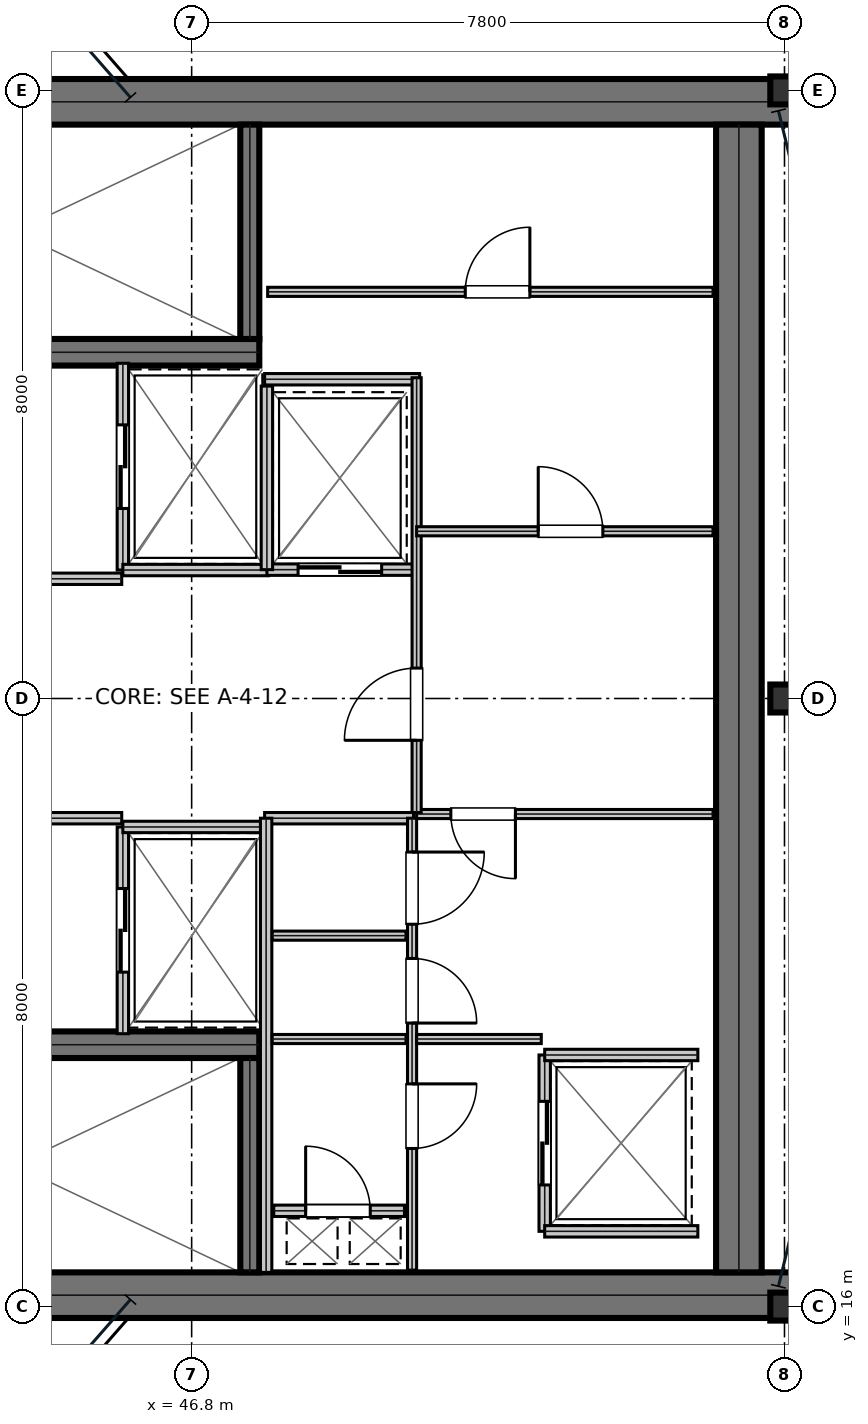
"""IFC4 building model, lengths in metres.
Left out: names, types, materials, properties, quantities, classifications, styles, units other than length and angle.
Written with IfcOpenShell. Run it as: python <this file> out.ifc"""

import sys

from ifc_helpers import new_model, si_unit, direction, frame, frame_2d, origin, origin_2d, place, context, subcontext, project, spatial, rectangle, i_section, extrude, element, fill, save


model = new_model("IFC4")
c1 = context("Model", 3, precision=1e-05, world=origin(), true_north=direction((0.0, 1.0)))
c2 = subcontext(c1, "Body", "Model", "MODEL_VIEW")
j1 = project(units=[si_unit("LENGTHUNIT", "METRE"), si_unit("PLANEANGLEUNIT", "RADIAN")], contexts=[c1])
p1 = place(None, origin())
s1 = spatial("IfcSite", under=j1, at=p1, CompositionType="ELEMENT")
p2 = place(p1, origin())
s2 = spatial("IfcBuilding", under=s1, at=p2, CompositionType="ELEMENT")
p3 = place(p2, frame((0.0, 0.0, 266.85)))
s3 = spatial("IfcBuildingStorey", under=s2, at=p3, CompositionType="ELEMENT", Elevation=266.85)
for number, where, z_axis, x_axis in (
    (1, (38.8, 31.85, 0.0), (0.0, 0.0, 1.0), (1.0, 0.0, 0.0)),
    (2, (38.8, 16.15, 0.0), (0.0, 0.0, 1.0), (1.0, 0.0, 0.0)),
):
    element("IfcWall", number, at=place(p3, frame(where, z_axis=z_axis, x_axis=x_axis)), inside=s3, PredefinedType="SHEAR", context=c2, shape_type="SweptSolid", body=[
        extrude(rectangle(XDim=16.0, YDim=0.6, at=frame_2d((8.0, 0.0))), origin(), (0.0, 0.0, 1.0), 3.81),
    ])
p4 = place(p3, frame((54.0, 16.45, 0.0), z_axis=(0.0, 0.0, 1.0), x_axis=(0.0, 1.0, 0.0)))
e3 = element("IfcWall", 3, at=p4, inside=s3, PredefinedType="SHEAR", context=c2, shape_type="SweptSolid", body=[
    extrude(rectangle(XDim=15.1, YDim=0.6, at=frame_2d((7.55, 0.0))), origin(), (0.0, 0.0, 1.0), 3.81),
])
p5 = place(p3, frame((39.98, 28.555, 0.0), z_axis=(0.0, 0.0, 1.0), x_axis=(1.0, 0.0, 0.0)))
e4 = element("IfcWall", 4, at=p5, inside=s3, PredefinedType="SHEAR", context=c2, shape_type="SweptSolid", body=[
    extrude(rectangle(XDim=7.71, YDim=0.35, at=frame_2d((3.855, 0.0))), origin(), (0.0, 0.0, 1.0), 3.81),
])
p6 = place(p5, frame((0.25, 0.0, 0.0)))
e5 = element("IfcOpeningElement", 5, at=p6, cuts=e4, PredefinedType="OPENING", context=c2, shape_type="SweptSolid", body=[
    extrude(rectangle(XDim=1.1, YDim=2.15, at=frame_2d((0.55, 1.075))), frame((0.0, 0.185, 0.0), z_axis=(0.0, -1.0, 0.0), x_axis=(1.0, 0.0, 0.0)), (0.0, 0.0, 1.0), 0.37),
])
p7 = place(p3, frame((39.98, 19.445, 0.0), z_axis=(0.0, 0.0, 1.0), x_axis=(1.0, 0.0, 0.0)))
e6 = element("IfcWall", 6, at=p7, inside=s3, PredefinedType="SHEAR", context=c2, shape_type="SweptSolid", body=[
    extrude(rectangle(XDim=7.71, YDim=0.35, at=frame_2d((3.855, 0.0))), origin(), (0.0, 0.0, 1.0), 3.81),
])
p8 = place(p7, frame((0.25, 0.0, 0.0)))
e7 = element("IfcOpeningElement", 7, at=p8, cuts=e6, PredefinedType="OPENING", context=c2, shape_type="SweptSolid", body=[
    extrude(rectangle(XDim=1.1, YDim=2.15, at=frame_2d((0.55, 1.075))), frame((0.0, 0.185, 0.0), z_axis=(0.0, -1.0, 0.0), x_axis=(1.0, 0.0, 0.0)), (0.0, 0.0, 1.0), 0.37),
])
for number, where, z_axis, x_axis in (
    (8, (47.565, 28.73, 0.0), (0.0, 0.0, 1.0), (0.0, 1.0, 0.0)),
    (9, (47.565, 16.45, 0.0), (0.0, 0.0, 1.0), (0.0, 1.0, 0.0)),
):
    element("IfcWall", number, at=place(p3, frame(where, z_axis=z_axis, x_axis=x_axis)), inside=s3, PredefinedType="SHEAR", context=c2, shape_type="SweptSolid", body=[
        extrude(rectangle(XDim=2.82, YDim=0.25, at=frame_2d((1.41, 0.0))), origin(), (0.0, 0.0, 1.0), 3.81),
    ])
for number, where, z_axis, x_axis in (
    (10, (54.6, 16.0, 0.0), (0.0, 0.0, 1.0), (1.0, 0.0, 0.0)),
    (11, (54.6, 24.0, 0.0), (0.0, 0.0, 1.0), (1.0, 0.0, 0.0)),
    (12, (54.6, 32.0, 0.0), (0.0, 0.0, 1.0), (1.0, 0.0, 0.0)),
):
    element("IfcColumn", number, at=place(p3, frame(where, z_axis=z_axis, x_axis=x_axis)), inside=s3, PredefinedType="COLUMN", context=c2, shape_type="SweptSolid", body=[
        extrude(i_section(OverallWidth=0.373, OverallDepth=0.368, WebThickness=0.015, FlangeThickness=0.024, at=origin_2d()), origin(), (0.0, 0.0, 1.0), 4.044),
    ])
p9 = place(p3, frame((39.98, 25.575, 0.0), z_axis=(0.0, 0.0, 1.0), x_axis=(1.0, 0.0, 0.0)))
e13 = element("IfcWall", 13, at=p9, inside=s3, PredefinedType="PARTITIONING", context=c2, shape_type="SweptSolid", body=[
    extrude(rectangle(XDim=5.9, YDim=0.15, at=frame_2d((2.95, 0.0))), origin(), (0.0, 0.0, 1.0), 3.81),
])
p10 = place(p9, frame((2.35, 0.0, 0.0)))
e14 = element("IfcOpeningElement", 14, at=p10, cuts=e13, PredefinedType="OPENING", context=c2, shape_type="SweptSolid", body=[
    extrude(rectangle(XDim=1.05, YDim=2.15, at=frame_2d((0.525, 1.075))), frame((0.0, 0.085, 0.0), z_axis=(0.0, -1.0, 0.0), x_axis=(1.0, 0.0, 0.0)), (0.0, 0.0, 1.0), 0.17),
])
p11 = place(p3, frame((39.98, 22.425, 0.0), z_axis=(0.0, 0.0, 1.0), x_axis=(1.0, 0.0, 0.0)))
e15 = element("IfcWall", 15, at=p11, inside=s3, PredefinedType="PARTITIONING", context=c2, shape_type="SweptSolid", body=[
    extrude(rectangle(XDim=5.9, YDim=0.15, at=frame_2d((2.95, 0.0))), origin(), (0.0, 0.0, 1.0), 3.81),
])
p12 = place(p11, frame((2.35, 0.0, 0.0)))
e16 = element("IfcOpeningElement", 16, at=p12, cuts=e15, PredefinedType="OPENING", context=c2, shape_type="SweptSolid", body=[
    extrude(rectangle(XDim=1.05, YDim=2.15, at=frame_2d((0.525, 1.075))), frame((0.0, 0.085, 0.0), z_axis=(0.0, -1.0, 0.0), x_axis=(1.0, 0.0, 0.0)), (0.0, 0.0, 1.0), 0.17),
])
p13 = place(p3, frame((45.895, 25.69, 0.0), z_axis=(0.0, 0.0, 1.0), x_axis=(0.0, 1.0, 0.0)))
e17 = element("IfcWall", 17, at=p13, inside=s3, PredefinedType="PARTITIONING", context=c2, shape_type="SweptSolid", body=[
    extrude(rectangle(XDim=2.72, YDim=0.15, at=frame_2d((1.36, 0.0))), origin(), (0.0, 0.0, 1.0), 3.81),
])
p14 = place(p13, frame((0.81, 0.0, 0.0)))
e18 = element("IfcOpeningElement", 18, at=p14, cuts=e17, PredefinedType="OPENING", context=c2, shape_type="SweptSolid", body=[
    extrude(rectangle(XDim=1.1, YDim=2.15, at=frame_2d((0.55, 1.075))), frame((0.0, 0.085, 0.0), z_axis=(0.0, -1.0, 0.0), x_axis=(1.0, 0.0, 0.0)), (0.0, 0.0, 1.0), 0.17),
])
p15 = place(p3, frame((45.895, 25.69, 0.0), z_axis=(0.0, 0.0, 1.0), x_axis=(1.0, 0.0, 0.0)))
e19 = element("IfcWall", 19, at=p15, inside=s3, PredefinedType="PARTITIONING", context=c2, shape_type="SweptSolid", body=[
    extrude(rectangle(XDim=1.915, YDim=0.15, at=frame_2d((0.958, 0.0))), origin(), (0.0, 0.0, 1.0), 3.81),
])
p16 = place(p3, frame((45.895, 19.59, 0.0), z_axis=(0.0, 0.0, 1.0), x_axis=(0.0, 1.0, 0.0)))
e20 = element("IfcWall", 20, at=p16, inside=s3, PredefinedType="PARTITIONING", context=c2, shape_type="SweptSolid", body=[
    extrude(rectangle(XDim=2.72, YDim=0.15, at=frame_2d((1.36, 0.0))), origin(), (0.0, 0.0, 1.0), 3.81),
])
p17 = place(p16, frame((0.81, 0.0, 0.0)))
e21 = element("IfcOpeningElement", 21, at=p17, cuts=e20, PredefinedType="OPENING", context=c2, shape_type="SweptSolid", body=[
    extrude(rectangle(XDim=1.1, YDim=2.15, at=frame_2d((0.55, 1.075))), frame((0.0, 0.085, 0.0), z_axis=(0.0, -1.0, 0.0), x_axis=(1.0, 0.0, 0.0)), (0.0, 0.0, 1.0), 0.17),
])
p18 = place(p3, frame((45.895, 22.31, 0.0), z_axis=(0.0, 0.0, 1.0), x_axis=(1.0, 0.0, 0.0)))
e22 = element("IfcWall", 22, at=p18, inside=s3, PredefinedType="PARTITIONING", context=c2, shape_type="SweptSolid", body=[
    extrude(rectangle(XDim=1.915, YDim=0.15, at=frame_2d((0.958, 0.0))), origin(), (0.0, 0.0, 1.0), 3.81),
])
p19 = place(p3, frame((47.79, 25.695, 0.0), z_axis=(0.0, 0.0, 1.0), x_axis=(1.0, 0.0, 0.0)))
e23 = element("IfcWall", 23, at=p19, inside=s3, PredefinedType="PARTITIONING", context=c2, shape_type="SweptSolid", body=[
    extrude(rectangle(XDim=1.92, YDim=0.15, at=frame_2d((0.96, 0.0))), origin(), (0.0, 0.0, 1.0), 3.81),
])
p20 = place(p19, frame((0.41, 0.0, 0.0)))
e24 = element("IfcOpeningElement", 24, at=p20, cuts=e23, PredefinedType="OPENING", context=c2, shape_type="SweptSolid", body=[
    extrude(rectangle(XDim=1.1, YDim=2.15, at=frame_2d((0.55, 1.075))), frame((0.0, 0.085, 0.0), z_axis=(0.0, -1.0, 0.0), x_axis=(1.0, 0.0, 0.0)), (0.0, 0.0, 1.0), 0.17),
])
p21 = place(p3, frame((47.79, 25.695, 0.0), z_axis=(0.0, 0.0, 1.0), x_axis=(0.0, 1.0, 0.0)))
e25 = element("IfcWall", 25, at=p21, inside=s3, PredefinedType="PARTITIONING", context=c2, shape_type="SweptSolid", body=[
    extrude(rectangle(XDim=2.415, YDim=0.15, at=frame_2d((1.208, 0.0))), origin(), (0.0, 0.0, 1.0), 3.81),
])
p22 = place(p3, frame((51.445, 16.99, 0.0), z_axis=(0.0, 0.0, 1.0), x_axis=(0.0, 1.0, 0.0)))
e26 = element("IfcWall", 26, at=p22, inside=s3, PredefinedType="PARTITIONING", context=c2, shape_type="SweptSolid", body=[
    extrude(rectangle(XDim=2.32, YDim=0.15, at=frame_2d((1.16, 0.0))), origin(), (0.0, 0.0, 1.0), 3.81),
])
p23 = place(p22, frame((0.61, 0.0, 0.0)))
e27 = element("IfcOpeningElement", 27, at=p23, cuts=e26, PredefinedType="OPENING", context=c2, shape_type="SweptSolid", body=[
    extrude(rectangle(XDim=1.1, YDim=2.15, at=frame_2d((0.55, 1.075))), frame((0.0, 0.085, 0.0), z_axis=(0.0, -1.0, 0.0), x_axis=(1.0, 0.0, 0.0)), (0.0, 0.0, 1.0), 0.17),
])
for number, where, z_axis, x_axis in (
    (28, (51.445, 16.99, 0.0), (0.0, 0.0, 1.0), (1.0, 0.0, 0.0)),
    (29, (51.445, 19.31, 0.0), (0.0, 0.0, 1.0), (1.0, 0.0, 0.0)),
):
    element("IfcWall", number, at=place(p3, frame(where, z_axis=z_axis, x_axis=x_axis)), inside=s3, PredefinedType="PARTITIONING", context=c2, shape_type="SweptSolid", body=[
        extrude(rectangle(XDim=2.015, YDim=0.15, at=frame_2d((1.007, 0.0))), origin(), (0.0, 0.0, 1.0), 3.81),
    ])
p24 = place(p3, frame((47.88, 17.26, 0.0), z_axis=(0.0, 0.0, 1.0), x_axis=(1.0, 0.0, 0.0)))
e30 = element("IfcWall", 30, at=p24, inside=s3, PredefinedType="PARTITIONING", context=c2, shape_type="SweptSolid", body=[
    extrude(rectangle(XDim=1.72, YDim=0.15, at=frame_2d((0.86, 0.0))), origin(), (0.0, 0.0, 1.0), 3.81),
])
p25 = place(p24, frame((0.42, 0.0, 0.0)))
e31 = element("IfcOpeningElement", 31, at=p25, cuts=e30, PredefinedType="OPENING", context=c2, shape_type="SweptSolid", body=[
    extrude(rectangle(XDim=0.85, YDim=2.15, at=frame_2d((0.425, 1.075))), frame((0.0, 0.085, 0.0), z_axis=(0.0, -1.0, 0.0), x_axis=(1.0, 0.0, 0.0)), (0.0, 0.0, 1.0), 0.17),
])
p26 = place(p3, frame((47.76, 22.425, 0.0), z_axis=(0.0, 0.0, 1.0), x_axis=(1.0, 0.0, 0.0)))
e32 = element("IfcWall", 32, at=p26, inside=s3, PredefinedType="PARTITIONING", context=c2, shape_type="SweptSolid", body=[
    extrude(rectangle(XDim=1.96, YDim=0.15, at=frame_2d((0.98, 0.0))), origin(), (0.0, 0.0, 1.0), 3.81),
])
p27 = place(p3, frame((47.78, 16.45, 0.0), z_axis=(0.0, 0.0, 1.0), x_axis=(0.0, 1.0, 0.0)))
e33 = element("IfcWall", 33, at=p27, inside=s3, PredefinedType="PARTITIONING", context=c2, shape_type="SweptSolid", body=[
    extrude(rectangle(XDim=5.975, YDim=0.15, at=frame_2d((2.988, 0.0))), origin(), (0.0, 0.0, 1.0), 3.81),
])
for number, where, z_axis, x_axis in (
    (34, (47.86, 19.52, 0.0), (0.0, 0.0, 1.0), (1.0, 0.0, 0.0)),
    (35, (47.86, 20.88, 0.0), (0.0, 0.0, 1.0), (1.0, 0.0, 0.0)),
):
    element("IfcWall", number, at=place(p3, frame(where, z_axis=z_axis, x_axis=x_axis)), inside=s3, PredefinedType="PARTITIONING", context=c2, shape_type="SweptSolid", body=[
        extrude(rectangle(XDim=1.76, YDim=0.12, at=frame_2d((0.88, 0.0))), origin(), (0.0, 0.0, 1.0), 3.81),
    ])
p28 = place(p3, frame((49.7, 16.48, 0.0), z_axis=(0.0, 0.0, 1.0), x_axis=(0.0, 1.0, 0.0)))
e36 = element("IfcWall", 36, at=p28, inside=s3, PredefinedType="PARTITIONING", context=c2, shape_type="SweptSolid", body=[
    extrude(rectangle(XDim=5.945, YDim=0.12, at=frame_2d((2.973, 0.0))), origin(), (0.0, 0.0, 1.0), 3.81),
])
p29 = place(p28, frame((1.6, 0.0, 0.0)))
e37 = element("IfcOpeningElement", 37, at=p29, cuts=e36, PredefinedType="OPENING", context=c2, shape_type="SweptSolid", body=[
    extrude(rectangle(XDim=0.85, YDim=2.15, at=frame_2d((0.425, 1.075))), frame((0.0, 0.07, 0.0), z_axis=(0.0, -1.0, 0.0), x_axis=(1.0, 0.0, 0.0)), (0.0, 0.0, 1.0), 0.14),
])
p30 = place(p28, frame((3.25, 0.0, 0.0)))
e38 = element("IfcOpeningElement", 38, at=p30, cuts=e36, PredefinedType="OPENING", context=c2, shape_type="SweptSolid", body=[
    extrude(rectangle(XDim=0.85, YDim=2.15, at=frame_2d((0.425, 1.075))), frame((0.0, 0.07, 0.0), z_axis=(0.0, -1.0, 0.0), x_axis=(1.0, 0.0, 0.0)), (0.0, 0.0, 1.0), 0.14),
])
p31 = place(p28, frame((4.55, 0.0, 0.0)))
e39 = element("IfcOpeningElement", 39, at=p31, cuts=e36, PredefinedType="OPENING", context=c2, shape_type="SweptSolid", body=[
    extrude(rectangle(XDim=0.95, YDim=2.15, at=frame_2d((0.475, 1.075))), frame((0.0, 0.07, 0.0), z_axis=(0.0, -1.0, 0.0), x_axis=(1.0, 0.0, 0.0)), (0.0, 0.0, 1.0), 0.14),
])
p32 = place(p3, frame((49.76, 22.48, 0.0), z_axis=(0.0, 0.0, 1.0), x_axis=(1.0, 0.0, 0.0)))
e40 = element("IfcWall", 40, at=p32, inside=s3, PredefinedType="PARTITIONING", context=c2, shape_type="SweptSolid", body=[
    extrude(rectangle(XDim=3.9, YDim=0.12, at=frame_2d((1.95, 0.0))), origin(), (0.0, 0.0, 1.0), 3.81),
])
p33 = place(p32, frame((0.45, 0.0, 0.0)))
e41 = element("IfcOpeningElement", 41, at=p33, cuts=e40, PredefinedType="OPENING", context=c2, shape_type="SweptSolid", body=[
    extrude(rectangle(XDim=0.85, YDim=2.15, at=frame_2d((0.425, 1.075))), frame((0.0, 0.07, 0.0), z_axis=(0.0, -1.0, 0.0), x_axis=(1.0, 0.0, 0.0)), (0.0, 0.0, 1.0), 0.14),
])
p34 = place(p3, frame((49.76, 19.52, 0.0), z_axis=(0.0, 0.0, 1.0), x_axis=(1.0, 0.0, 0.0)))
e42 = element("IfcWall", 42, at=p34, inside=s3, PredefinedType="PARTITIONING", context=c2, shape_type="SweptSolid", body=[
    extrude(rectangle(XDim=1.64, YDim=0.12, at=frame_2d((0.82, 0.0))), origin(), (0.0, 0.0, 1.0), 3.81),
])
p35 = place(p3, frame((47.76, 28.2, 0.0), z_axis=(0.0, 0.0, 1.0), x_axis=(1.0, 0.0, 0.0)))
e43 = element("IfcWall", 43, at=p35, inside=s3, PredefinedType="PARTITIONING", context=c2, shape_type="SweptSolid", body=[
    extrude(rectangle(XDim=2.04, YDim=0.15, at=frame_2d((1.02, 0.0))), origin(), (0.0, 0.0, 1.0), 3.81),
])
p36 = place(p3, frame((49.76, 22.5, 0.0), z_axis=(0.0, 0.0, 1.0), x_axis=(0.0, 1.0, 0.0)))
e44 = element("IfcWall", 44, at=p36, inside=s3, PredefinedType="PARTITIONING", context=c2, shape_type="SweptSolid", body=[
    extrude(rectangle(XDim=5.72, YDim=0.12, at=frame_2d((2.86, 0.0))), origin(), (0.0, 0.0, 1.0), 3.81),
])
p37 = place(p36, frame((0.95, 0.0, 0.0)))
e45 = element("IfcOpeningElement", 45, at=p37, cuts=e44, PredefinedType="OPENING", context=c2, shape_type="SweptSolid", body=[
    extrude(rectangle(XDim=0.95, YDim=2.15, at=frame_2d((0.475, 1.075))), frame((0.0, 0.07, 0.0), z_axis=(0.0, -1.0, 0.0), x_axis=(1.0, 0.0, 0.0)), (0.0, 0.0, 1.0), 0.14),
])
p38 = place(p3, frame((49.76, 26.2, 0.0), z_axis=(0.0, 0.0, 1.0), x_axis=(1.0, 0.0, 0.0)))
e46 = element("IfcWall", 46, at=p38, inside=s3, PredefinedType="PARTITIONING", context=c2, shape_type="SweptSolid", body=[
    extrude(rectangle(XDim=3.9, YDim=0.12, at=frame_2d((1.95, 0.0))), origin(), (0.0, 0.0, 1.0), 3.81),
])
p39 = place(p38, frame((1.6, 0.0, 0.0)))
e47 = element("IfcOpeningElement", 47, at=p39, cuts=e46, PredefinedType="OPENING", context=c2, shape_type="SweptSolid", body=[
    extrude(rectangle(XDim=0.85, YDim=2.15, at=frame_2d((0.425, 1.075))), frame((0.0, 0.07, 0.0), z_axis=(0.0, -1.0, 0.0), x_axis=(1.0, 0.0, 0.0)), (0.0, 0.0, 1.0), 0.14),
])
p40 = place(p3, frame((47.8, 29.35, 0.0), z_axis=(0.0, 0.0, 1.0), x_axis=(1.0, 0.0, 0.0)))
e48 = element("IfcWall", 48, at=p40, inside=s3, PredefinedType="PARTITIONING", context=c2, shape_type="SweptSolid", body=[
    extrude(rectangle(XDim=5.86, YDim=0.12, at=frame_2d((2.93, 0.0))), origin(), (0.0, 0.0, 1.0), 3.81),
])
p41 = place(p40, frame((2.6, 0.0, 0.0)))
e49 = element("IfcOpeningElement", 49, at=p41, cuts=e48, PredefinedType="OPENING", context=c2, shape_type="SweptSolid", body=[
    extrude(rectangle(XDim=0.85, YDim=2.15, at=frame_2d((0.425, 1.075))), frame((0.0, 0.07, 0.0), z_axis=(0.0, -1.0, 0.0), x_axis=(1.0, 0.0, 0.0)), (0.0, 0.0, 1.0), 0.14),
])
p42 = place(p14, frame((1.1, 0.0, 0.0), z_axis=(0.0, 0.0, 1.0), x_axis=(-1.0, 0.0, 0.0)))
e50 = element("IfcDoor", 50, at=p42, inside=s3, OperationType="DOUBLE_DOOR_SLIDING", PredefinedType="DOOR", context=c2, shape_type="SweptSolid", body=[
    extrude(rectangle(XDim=1.1, YDim=2.15, at=frame_2d((0.55, 1.075))), frame((0.0, 0.025, 0.0), z_axis=(0.0, -1.0, 0.0), x_axis=(1.0, 0.0, 0.0)), (0.0, 0.0, 1.0), 0.05),
])
fill(e18, e50)
p43 = place(p17, frame((1.1, 0.0, 0.0), z_axis=(0.0, 0.0, 1.0), x_axis=(-1.0, 0.0, 0.0)))
e51 = element("IfcDoor", 51, at=p43, inside=s3, OperationType="DOUBLE_DOOR_SLIDING", PredefinedType="DOOR", context=c2, shape_type="SweptSolid", body=[
    extrude(rectangle(XDim=1.1, YDim=2.15, at=frame_2d((0.55, 1.075))), frame((0.0, 0.025, 0.0), z_axis=(0.0, -1.0, 0.0), x_axis=(1.0, 0.0, 0.0)), (0.0, 0.0, 1.0), 0.05),
])
fill(e21, e51)
p44 = place(p20, frame((1.1, 0.0, 0.0), z_axis=(0.0, 0.0, 1.0), x_axis=(-1.0, 0.0, 0.0)))
e52 = element("IfcDoor", 52, at=p44, inside=s3, OperationType="DOUBLE_DOOR_SLIDING", PredefinedType="DOOR", context=c2, shape_type="SweptSolid", body=[
    extrude(rectangle(XDim=1.1, YDim=2.15, at=frame_2d((0.55, 1.075))), frame((0.0, 0.025, 0.0), z_axis=(0.0, -1.0, 0.0), x_axis=(1.0, 0.0, 0.0)), (0.0, 0.0, 1.0), 0.05),
])
fill(e24, e52)
p45 = place(p23, frame((1.1, 0.0, 0.0), z_axis=(0.0, 0.0, 1.0), x_axis=(-1.0, 0.0, 0.0)))
e53 = element("IfcDoor", 53, at=p45, inside=s3, OperationType="DOUBLE_DOOR_SLIDING", PredefinedType="DOOR", context=c2, shape_type="SweptSolid", body=[
    extrude(rectangle(XDim=1.1, YDim=2.15, at=frame_2d((0.55, 1.075))), frame((0.0, 0.025, 0.0), z_axis=(0.0, -1.0, 0.0), x_axis=(1.0, 0.0, 0.0)), (0.0, 0.0, 1.0), 0.05),
])
fill(e27, e53)
p46 = place(p25, origin())
e54 = element("IfcDoor", 54, at=p46, inside=s3, OperationType="SINGLE_SWING_LEFT", PredefinedType="TRAPDOOR", context=c2, shape_type="SweptSolid", body=[
    extrude(rectangle(XDim=0.85, YDim=2.15, at=frame_2d((0.425, 1.075))), frame((0.0, 0.025, 0.0), z_axis=(0.0, -1.0, 0.0), x_axis=(1.0, 0.0, 0.0)), (0.0, 0.0, 1.0), 0.05),
])
fill(e31, e54)
p47 = place(p29, frame((0.85, 0.0, 0.0), z_axis=(0.0, 0.0, 1.0), x_axis=(-1.0, 0.0, 0.0)))
e55 = element("IfcDoor", 55, at=p47, inside=s3, OperationType="SINGLE_SWING_LEFT", PredefinedType="DOOR", context=c2, shape_type="SweptSolid", body=[
    extrude(rectangle(XDim=0.85, YDim=2.15, at=frame_2d((0.425, 1.075))), frame((0.0, 0.025, 0.0), z_axis=(0.0, -1.0, 0.0), x_axis=(1.0, 0.0, 0.0)), (0.0, 0.0, 1.0), 0.05),
])
fill(e37, e55)
p48 = place(p30, frame((0.85, 0.0, 0.0), z_axis=(0.0, 0.0, 1.0), x_axis=(-1.0, 0.0, 0.0)))
e56 = element("IfcDoor", 56, at=p48, inside=s3, OperationType="SINGLE_SWING_RIGHT", PredefinedType="DOOR", context=c2, shape_type="SweptSolid", body=[
    extrude(rectangle(XDim=0.85, YDim=2.15, at=frame_2d((0.425, 1.075))), frame((0.0, 0.025, 0.0), z_axis=(0.0, -1.0, 0.0), x_axis=(1.0, 0.0, 0.0)), (0.0, 0.0, 1.0), 0.05),
])
fill(e38, e56)
p49 = place(p31, frame((0.95, 0.0, 0.0), z_axis=(0.0, 0.0, 1.0), x_axis=(-1.0, 0.0, 0.0)))
e57 = element("IfcDoor", 57, at=p49, inside=s3, OperationType="SINGLE_SWING_LEFT", PredefinedType="DOOR", context=c2, shape_type="SweptSolid", body=[
    extrude(rectangle(XDim=0.95, YDim=2.15, at=frame_2d((0.475, 1.075))), frame((0.0, 0.025, 0.0), z_axis=(0.0, -1.0, 0.0), x_axis=(1.0, 0.0, 0.0)), (0.0, 0.0, 1.0), 0.05),
])
fill(e39, e57)
p50 = place(p33, frame((0.85, 0.0, 0.0), z_axis=(0.0, 0.0, 1.0), x_axis=(-1.0, 0.0, 0.0)))
e58 = element("IfcDoor", 58, at=p50, inside=s3, OperationType="SINGLE_SWING_LEFT", PredefinedType="DOOR", context=c2, shape_type="SweptSolid", body=[
    extrude(rectangle(XDim=0.85, YDim=2.15, at=frame_2d((0.425, 1.075))), frame((0.0, 0.025, 0.0), z_axis=(0.0, -1.0, 0.0), x_axis=(1.0, 0.0, 0.0)), (0.0, 0.0, 1.0), 0.05),
])
fill(e41, e58)
p51 = place(p37, origin())
e59 = element("IfcDoor", 59, at=p51, inside=s3, OperationType="SINGLE_SWING_LEFT", PredefinedType="DOOR", context=c2, shape_type="SweptSolid", body=[
    extrude(rectangle(XDim=0.95, YDim=2.15, at=frame_2d((0.475, 1.075))), frame((0.0, 0.025, 0.0), z_axis=(0.0, -1.0, 0.0), x_axis=(1.0, 0.0, 0.0)), (0.0, 0.0, 1.0), 0.05),
])
fill(e45, e59)
p52 = place(p39, origin())
e60 = element("IfcDoor", 60, at=p52, inside=s3, OperationType="SINGLE_SWING_LEFT", PredefinedType="DOOR", context=c2, shape_type="SweptSolid", body=[
    extrude(rectangle(XDim=0.85, YDim=2.15, at=frame_2d((0.425, 1.075))), frame((0.0, 0.025, 0.0), z_axis=(0.0, -1.0, 0.0), x_axis=(1.0, 0.0, 0.0)), (0.0, 0.0, 1.0), 0.05),
])
fill(e47, e60)
p53 = place(p41, origin())
e61 = element("IfcDoor", 61, at=p53, inside=s3, OperationType="SINGLE_SWING_RIGHT", PredefinedType="DOOR", context=c2, shape_type="SweptSolid", body=[
    extrude(rectangle(XDim=0.85, YDim=2.15, at=frame_2d((0.425, 1.075))), frame((0.0, 0.025, 0.0), z_axis=(0.0, -1.0, 0.0), x_axis=(1.0, 0.0, 0.0)), (0.0, 0.0, 1.0), 0.05),
])
fill(e49, e61)
save(model, sys.argv[1])
